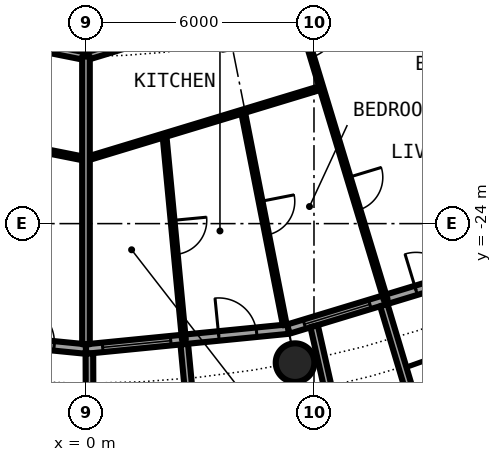
"""IFC4 building model, lengths in metres.
Left out: names, types, materials, properties, quantities, classifications, styles, units other than length and angle.
Written with IfcOpenShell. Run it as: python <this file> out.ifc"""

import sys

from ifc_helpers import new_model, si_unit, direction, frame, frame_2d, origin, origin_2d, place, context, subcontext, project, spatial, rectangle, hollow_circle, extrude, element, fill, save


model = new_model("IFC4")
c1 = context("Model", 3, precision=1e-05, world=origin(), true_north=direction((0.0, 1.0)))
c2 = subcontext(c1, "Body", "Model", "MODEL_VIEW")
j1 = project(units=[si_unit("LENGTHUNIT", "METRE"), si_unit("PLANEANGLEUNIT", "RADIAN")], contexts=[c1])
p1 = place(None, origin())
s1 = spatial("IfcSite", under=j1, at=p1, CompositionType="ELEMENT")
p2 = place(p1, origin())
s2 = spatial("IfcBuilding", under=s1, at=p2, CompositionType="ELEMENT")
p3 = place(p2, frame((0.0, 0.0, 72.75)))
s3 = spatial("IfcBuildingStorey", under=s2, at=p3, CompositionType="ELEMENT", Elevation=72.75)
p4 = place(p3, frame((5.501, -27.658, 0.0), z_axis=(0.0, 0.0, 1.0), x_axis=(1.0, 0.0, 0.0)))
e1 = element("IfcColumn", 1, at=p4, inside=s3, PredefinedType="COLUMN", context=c2, shape_type="SweptSolid", body=[
    extrude(hollow_circle(Radius=0.508, WallThickness=0.04, at=origin_2d()), origin(), (0.0, 0.0, 1.0), 3.05),
])
p5 = place(p3, frame((-5.326, -26.775, 0.0), z_axis=(0.0, 0.0, 1.0), x_axis=(0.995173996315, -0.098126026407, 0.0)))
e2 = element("IfcWall", 2, at=p5, inside=s3, PredefinedType="SOLIDWALL", context=c2, shape_type="SweptSolid", body=[
    extrude(rectangle(XDim=5.352, YDim=0.25, at=frame_2d((2.676, 0.0))), origin(), (0.0, 0.0, 1.0), 2.7),
])
p6 = place(p5, frame((0.441, 0.0, 0.3)))
e3 = element("IfcOpeningElement", 3, at=p6, cuts=e2, PredefinedType="OPENING", context=c2, shape_type="SweptSolid", body=[
    extrude(rectangle(XDim=1.8, YDim=2.1, at=frame_2d((0.9, 1.05))), frame((0.0, 0.135, 0.0), z_axis=(0.0, -1.0, 0.0), x_axis=(1.0, 0.0, 0.0)), (0.0, 0.0, 1.0), 0.27),
])
p7 = place(p5, frame((3.51, 0.0, 0.0)))
e4 = element("IfcOpeningElement", 4, at=p7, cuts=e2, PredefinedType="OPENING", context=c2, shape_type="SweptSolid", body=[
    extrude(rectangle(XDim=1.0, YDim=2.2, at=frame_2d((0.5, 1.1))), frame((0.0, 0.135, 0.0), z_axis=(0.0, -1.0, 0.0), x_axis=(1.0, 0.0, 0.0)), (0.0, 0.0, 1.0), 0.27),
])
p8 = place(p3, frame((0.0, -27.3, 0.0), z_axis=(0.0, 0.0, 1.0), x_axis=(0.995173996315, 0.098126026407, 0.0)))
e5 = element("IfcWall", 5, at=p8, inside=s3, PredefinedType="SOLIDWALL", context=c2, shape_type="SweptSolid", body=[
    extrude(rectangle(XDim=5.352, YDim=0.25, at=frame_2d((2.676, 0.0))), origin(), (0.0, 0.0, 1.0), 2.7),
])
p9 = place(p8, frame((0.441, 0.0, 0.3)))
e6 = element("IfcOpeningElement", 6, at=p9, cuts=e5, PredefinedType="OPENING", context=c2, shape_type="SweptSolid", body=[
    extrude(rectangle(XDim=1.8, YDim=2.1, at=frame_2d((0.9, 1.05))), frame((0.0, 0.135, 0.0), z_axis=(0.0, -1.0, 0.0), x_axis=(1.0, 0.0, 0.0)), (0.0, 0.0, 1.0), 0.27),
])
p10 = place(p8, frame((3.51, 0.0, 0.0)))
e7 = element("IfcOpeningElement", 7, at=p10, cuts=e5, PredefinedType="OPENING", context=c2, shape_type="SweptSolid", body=[
    extrude(rectangle(XDim=1.0, YDim=2.2, at=frame_2d((0.5, 1.1))), frame((0.0, 0.135, 0.0), z_axis=(0.0, -1.0, 0.0), x_axis=(1.0, 0.0, 0.0)), (0.0, 0.0, 1.0), 0.27),
])
p11 = place(p3, frame((0.09, -27.417, -0.03), z_axis=(0.0, 0.0, 1.0), x_axis=(0.00347308367, -0.999993968827, 0.0)))
e8 = element("IfcWall", 8, at=p11, inside=s3, PredefinedType="SOLIDWALL", context=c2, shape_type="SweptSolid", body=[
    extrude(rectangle(XDim=2.882, YDim=0.2, at=frame_2d((1.441, 0.0))), origin(), (0.0, 0.0, 1.0), 2.73),
])
p12 = place(p3, frame((2.586, -27.171, -0.03), z_axis=(0.0, 0.0, 1.0), x_axis=(0.094548432284, -0.995520262954, 0.0)))
e9 = element("IfcWall", 9, at=p12, inside=s3, PredefinedType="SOLIDWALL", context=c2, shape_type="SweptSolid", body=[
    extrude(rectangle(XDim=3.006, YDim=0.2, at=frame_2d((1.503, 0.0))), origin(), (0.0, 0.0, 1.0), 2.73),
])
p13 = place(p3, frame((5.326, -26.775, 0.0), z_axis=(0.0, 0.0, 1.0), x_axis=(0.956965678721, 0.290201119486, 0.0)))
e10 = element("IfcWall", 10, at=p13, inside=s3, PredefinedType="SOLIDWALL", context=c2, shape_type="SweptSolid", body=[
    extrude(rectangle(XDim=5.351, YDim=0.25, at=frame_2d((2.676, 0.0))), origin(), (0.0, 0.0, 1.0), 2.7),
])
p14 = place(p13, frame((0.441, 0.0, 0.3)))
e11 = element("IfcOpeningElement", 11, at=p14, cuts=e10, PredefinedType="OPENING", context=c2, shape_type="SweptSolid", body=[
    extrude(rectangle(XDim=1.8, YDim=2.1, at=frame_2d((0.9, 1.05))), frame((0.0, 0.135, 0.0), z_axis=(0.0, -1.0, 0.0), x_axis=(1.0, 0.0, 0.0)), (0.0, 0.0, 1.0), 0.27),
])
p15 = place(p13, frame((3.51, 0.0, 0.0)))
e12 = element("IfcOpeningElement", 12, at=p15, cuts=e10, PredefinedType="OPENING", context=c2, shape_type="SweptSolid", body=[
    extrude(rectangle(XDim=1.0, YDim=2.2, at=frame_2d((0.5, 1.1))), frame((0.0, 0.135, 0.0), z_axis=(0.0, -1.0, 0.0), x_axis=(1.0, 0.0, 0.0)), (0.0, 0.0, 1.0), 0.27),
])
p16 = place(p3, frame((6.004, -26.7, -0.03), z_axis=(0.0, 0.0, 1.0), x_axis=(0.219609259383, -0.975587911566, 0.0)))
e13 = element("IfcWall", 13, at=p16, inside=s3, PredefinedType="SOLIDWALL", context=c2, shape_type="SweptSolid", body=[
    extrude(rectangle(XDim=2.933, YDim=0.2, at=frame_2d((1.466, 0.0))), origin(), (0.0, 0.0, 1.0), 2.73),
])
p17 = place(p3, frame((7.837, -26.144, -0.03), z_axis=(0.0, 0.0, 1.0), x_axis=(0.287064767992, -0.957911174889, 0.0)))
e14 = element("IfcWall", 14, at=p17, inside=s3, PredefinedType="SOLIDWALL", context=c2, shape_type="SweptSolid", body=[
    extrude(rectangle(XDim=3.006, YDim=0.2, at=frame_2d((1.503, 0.0))), origin(), (0.0, 0.0, 1.0), 2.73),
])
p18 = place(p3, frame((-2.133, -21.876, 0.0), z_axis=(0.0, 0.0, 1.0), x_axis=(0.980804550577, -0.194993419292, 0.0)))
e15 = element("IfcWall", 15, at=p18, inside=s3, PredefinedType="PARTITIONING", context=c2, shape_type="SweptSolid", body=[
    extrude(rectangle(XDim=2.175, YDim=0.1, at=frame_2d((1.087, 0.0))), origin(), (0.0, 0.0, 1.0), 2.7),
])
p19 = place(p3, frame((0.0, -22.3, 0.0), z_axis=(0.0, 0.0, 1.0), x_axis=(0.956940987612, 0.290282528286, 0.0)))
e16 = element("IfcWall", 16, at=p19, inside=s3, PredefinedType="PARTITIONING", context=c2, shape_type="SweptSolid", body=[
    extrude(rectangle(XDim=6.477, YDim=0.1, at=frame_2d((3.238, 0.0))), origin(), (0.0, 0.0, 1.0), 2.7),
])
p20 = place(p3, frame((-7.501, -18.108, 0.0), z_axis=(0.0, 0.0, 1.0), x_axis=(0.980781515054, -0.195109250749, 0.0)))
e17 = element("IfcWall", 17, at=p20, inside=s3, PredefinedType="PARTITIONING", context=c2, shape_type="SweptSolid", body=[
    extrude(rectangle(XDim=7.648, YDim=0.2, at=frame_2d((3.824, 0.0))), origin(), (0.0, 0.0, 1.0), 2.38),
])
p21 = place(p20, frame((2.25, 0.0, 0.0)))
e18 = element("IfcOpeningElement", 18, at=p21, cuts=e17, PredefinedType="OPENING", context=c2, shape_type="SweptSolid", body=[
    extrude(rectangle(XDim=1.0, YDim=2.3, at=frame_2d((0.5, 1.15))), frame((0.0, 0.11, 0.0), z_axis=(0.0, -1.0, 0.0), x_axis=(1.0, 0.0, 0.0)), (0.0, 0.0, 1.0), 0.22),
])
p22 = place(p3, frame((0.0, -19.6, 0.0), z_axis=(0.0, 0.0, 1.0), x_axis=(0.956932298225, 0.290311172044, 0.0)))
e19 = element("IfcWall", 19, at=p22, inside=s3, PredefinedType="PARTITIONING", context=c2, shape_type="SweptSolid", body=[
    extrude(rectangle(XDim=11.219, YDim=0.2, at=frame_2d((5.61, 0.0))), origin(), (0.0, 0.0, 1.0), 2.38),
])
p23 = place(p22, frame((7.086, 0.0, 0.0)))
e20 = element("IfcOpeningElement", 20, at=p23, cuts=e19, PredefinedType="OPENING", context=c2, shape_type="SweptSolid", body=[
    extrude(rectangle(XDim=1.0, YDim=2.3, at=frame_2d((0.5, 1.15))), frame((0.0, 0.11, 0.0), z_axis=(0.0, -1.0, 0.0), x_axis=(1.0, 0.0, 0.0)), (0.0, 0.0, 1.0), 0.22),
])
p24 = place(p3, frame((0.0, -27.175, 0.0), z_axis=(0.0, 0.0, 1.0), x_axis=(0.0, 1.0, 0.0)))
e21 = element("IfcWall", 21, at=p24, inside=s3, PredefinedType="PARTITIONING", context=c2, shape_type="SweptSolid", body=[
    extrude(rectangle(XDim=7.575, YDim=0.2, at=frame_2d((3.788, 0.0))), origin(), (0.0, 0.0, 1.0), 2.7),
])
p25 = place(p3, frame((2.065, -21.674, 0.0), z_axis=(0.0, 0.0, 1.0), x_axis=(0.094751520537, -0.99550095397, 0.0)))
e22 = element("IfcWall", 22, at=p25, inside=s3, PredefinedType="PARTITIONING", context=c2, shape_type="SweptSolid", body=[
    extrude(rectangle(XDim=5.403, YDim=0.1, at=frame_2d((2.702, 0.0))), origin(), (0.0, 0.0, 1.0), 2.7),
])
p26 = place(p25, frame((2.252, 0.0, 0.0)))
e23 = element("IfcOpeningElement", 23, at=p26, cuts=e22, PredefinedType="OPENING", context=c2, shape_type="SweptSolid", body=[
    extrude(rectangle(XDim=0.9, YDim=2.3, at=frame_2d((0.45, 1.15))), frame((0.0, 0.06, 0.0), z_axis=(0.0, -1.0, 0.0), x_axis=(1.0, 0.0, 0.0)), (0.0, 0.0, 1.0), 0.12),
])
p27 = place(p3, frame((4.13, -21.047, 0.0), z_axis=(0.0, 0.0, 1.0), x_axis=(0.192433779325, -0.981309961518, 0.0)))
e24 = element("IfcWall", 24, at=p27, inside=s3, PredefinedType="PARTITIONING", context=c2, shape_type="SweptSolid", body=[
    extrude(rectangle(XDim=5.727, YDim=0.1, at=frame_2d((2.863, 0.0))), origin(), (0.0, 0.0, 1.0), 2.7),
])
p28 = place(p27, frame((2.414, 0.0, 0.0)))
e25 = element("IfcOpeningElement", 25, at=p28, cuts=e24, PredefinedType="OPENING", context=c2, shape_type="SweptSolid", body=[
    extrude(rectangle(XDim=0.9, YDim=2.3, at=frame_2d((0.45, 1.15))), frame((0.0, 0.06, 0.0), z_axis=(0.0, -1.0, 0.0), x_axis=(1.0, 0.0, 0.0)), (0.0, 0.0, 1.0), 0.12),
])
p29 = place(p3, frame((5.445, -17.948, 0.0), z_axis=(0.0, 0.0, 1.0), x_axis=(0.290158700753, -0.956978541231, 0.0)))
e26 = element("IfcWall", 26, at=p29, inside=s3, PredefinedType="PARTITIONING", context=c2, shape_type="SweptSolid", body=[
    extrude(rectangle(XDim=8.419, YDim=0.1, at=frame_2d((4.209, 0.0))), origin(), (0.0, 0.0, 1.0), 2.7),
])
p30 = place(p29, frame((0.842, 0.0, 0.0)))
e27 = element("IfcOpeningElement", 27, at=p30, cuts=e26, PredefinedType="OPENING", context=c2, shape_type="SweptSolid", body=[
    extrude(rectangle(XDim=0.9, YDim=2.3, at=frame_2d((0.45, 1.15))), frame((0.0, 0.06, 0.0), z_axis=(0.0, -1.0, 0.0), x_axis=(1.0, 0.0, 0.0)), (0.0, 0.0, 1.0), 0.12),
])
p31 = place(p29, frame((5.052, 0.0, 0.0)))
e28 = element("IfcOpeningElement", 28, at=p31, cuts=e26, PredefinedType="OPENING", context=c2, shape_type="SweptSolid", body=[
    extrude(rectangle(XDim=0.9, YDim=2.3, at=frame_2d((0.45, 1.15))), frame((0.0, 0.06, 0.0), z_axis=(0.0, -1.0, 0.0), x_axis=(1.0, 0.0, 0.0)), (0.0, 0.0, 1.0), 0.12),
])
p32 = place(p7, origin())
e29 = element("IfcDoor", 29, at=p32, inside=s3, OperationType="SINGLE_SWING_LEFT", PredefinedType="DOOR", context=c2, shape_type="SweptSolid", body=[
    extrude(rectangle(XDim=1.0, YDim=2.2, at=frame_2d((0.5, 1.1))), frame((0.0, 0.025, 0.0), z_axis=(0.0, -1.0, 0.0), x_axis=(1.0, 0.0, 0.0)), (0.0, 0.0, 1.0), 0.05),
])
fill(e4, e29)
p33 = place(p9, origin())
e30 = element("IfcWindow", 30, at=p33, inside=s3, PartitioningType="SINGLE_PANEL", PredefinedType="WINDOW", context=c2, shape_type="SweptSolid", body=[
    extrude(rectangle(XDim=1.8, YDim=2.1, at=frame_2d((0.9, 1.05))), frame((0.0, 0.03, 0.0), z_axis=(0.0, -1.0, 0.0), x_axis=(1.0, 0.0, 0.0)), (0.0, 0.0, 1.0), 0.06),
])
fill(e6, e30)
p34 = place(p10, origin())
e31 = element("IfcDoor", 31, at=p34, inside=s3, OperationType="SINGLE_SWING_LEFT", PredefinedType="DOOR", context=c2, shape_type="SweptSolid", body=[
    extrude(rectangle(XDim=1.0, YDim=2.2, at=frame_2d((0.5, 1.1))), frame((0.0, 0.025, 0.0), z_axis=(0.0, -1.0, 0.0), x_axis=(1.0, 0.0, 0.0)), (0.0, 0.0, 1.0), 0.05),
])
fill(e7, e31)
p35 = place(p14, origin())
e32 = element("IfcWindow", 32, at=p35, inside=s3, PartitioningType="SINGLE_PANEL", PredefinedType="WINDOW", context=c2, shape_type="SweptSolid", body=[
    extrude(rectangle(XDim=1.8, YDim=2.1, at=frame_2d((0.9, 1.05))), frame((0.0, 0.03, 0.0), z_axis=(0.0, -1.0, 0.0), x_axis=(1.0, 0.0, 0.0)), (0.0, 0.0, 1.0), 0.06),
])
fill(e11, e32)
p36 = place(p15, origin())
e33 = element("IfcDoor", 33, at=p36, inside=s3, OperationType="SINGLE_SWING_LEFT", PredefinedType="DOOR", context=c2, shape_type="SweptSolid", body=[
    extrude(rectangle(XDim=1.0, YDim=2.2, at=frame_2d((0.5, 1.1))), frame((0.0, 0.025, 0.0), z_axis=(0.0, -1.0, 0.0), x_axis=(1.0, 0.0, 0.0)), (0.0, 0.0, 1.0), 0.05),
])
fill(e12, e33)
p37 = place(p30, origin())
e34 = element("IfcDoor", 34, at=p37, inside=s3, OperationType="SINGLE_SWING_LEFT", PredefinedType="DOOR", context=c2, shape_type="SweptSolid", body=[
    extrude(rectangle(XDim=0.9, YDim=2.3, at=frame_2d((0.45, 1.15))), frame((0.0, 0.025, 0.0), z_axis=(0.0, -1.0, 0.0), x_axis=(1.0, 0.0, 0.0)), (0.0, 0.0, 1.0), 0.05),
])
fill(e27, e34)
p38 = place(p31, origin())
e35 = element("IfcDoor", 35, at=p38, inside=s3, OperationType="SINGLE_SWING_RIGHT", PredefinedType="DOOR", context=c2, shape_type="SweptSolid", body=[
    extrude(rectangle(XDim=0.9, YDim=2.3, at=frame_2d((0.45, 1.15))), frame((0.0, 0.025, 0.0), z_axis=(0.0, -1.0, 0.0), x_axis=(1.0, 0.0, 0.0)), (0.0, 0.0, 1.0), 0.05),
])
fill(e28, e35)
p39 = place(p28, origin())
e36 = element("IfcDoor", 36, at=p39, inside=s3, OperationType="SINGLE_SWING_RIGHT", PredefinedType="DOOR", context=c2, shape_type="SweptSolid", body=[
    extrude(rectangle(XDim=0.9, YDim=2.3, at=frame_2d((0.45, 1.15))), frame((0.0, 0.025, 0.0), z_axis=(0.0, -1.0, 0.0), x_axis=(1.0, 0.0, 0.0)), (0.0, 0.0, 1.0), 0.05),
])
fill(e25, e36)
p40 = place(p26, origin())
e37 = element("IfcDoor", 37, at=p40, inside=s3, OperationType="SINGLE_SWING_LEFT", PredefinedType="DOOR", context=c2, shape_type="SweptSolid", body=[
    extrude(rectangle(XDim=0.9, YDim=2.3, at=frame_2d((0.45, 1.15))), frame((0.0, 0.025, 0.0), z_axis=(0.0, -1.0, 0.0), x_axis=(1.0, 0.0, 0.0)), (0.0, 0.0, 1.0), 0.05),
])
fill(e23, e37)
save(model, sys.argv[1])
